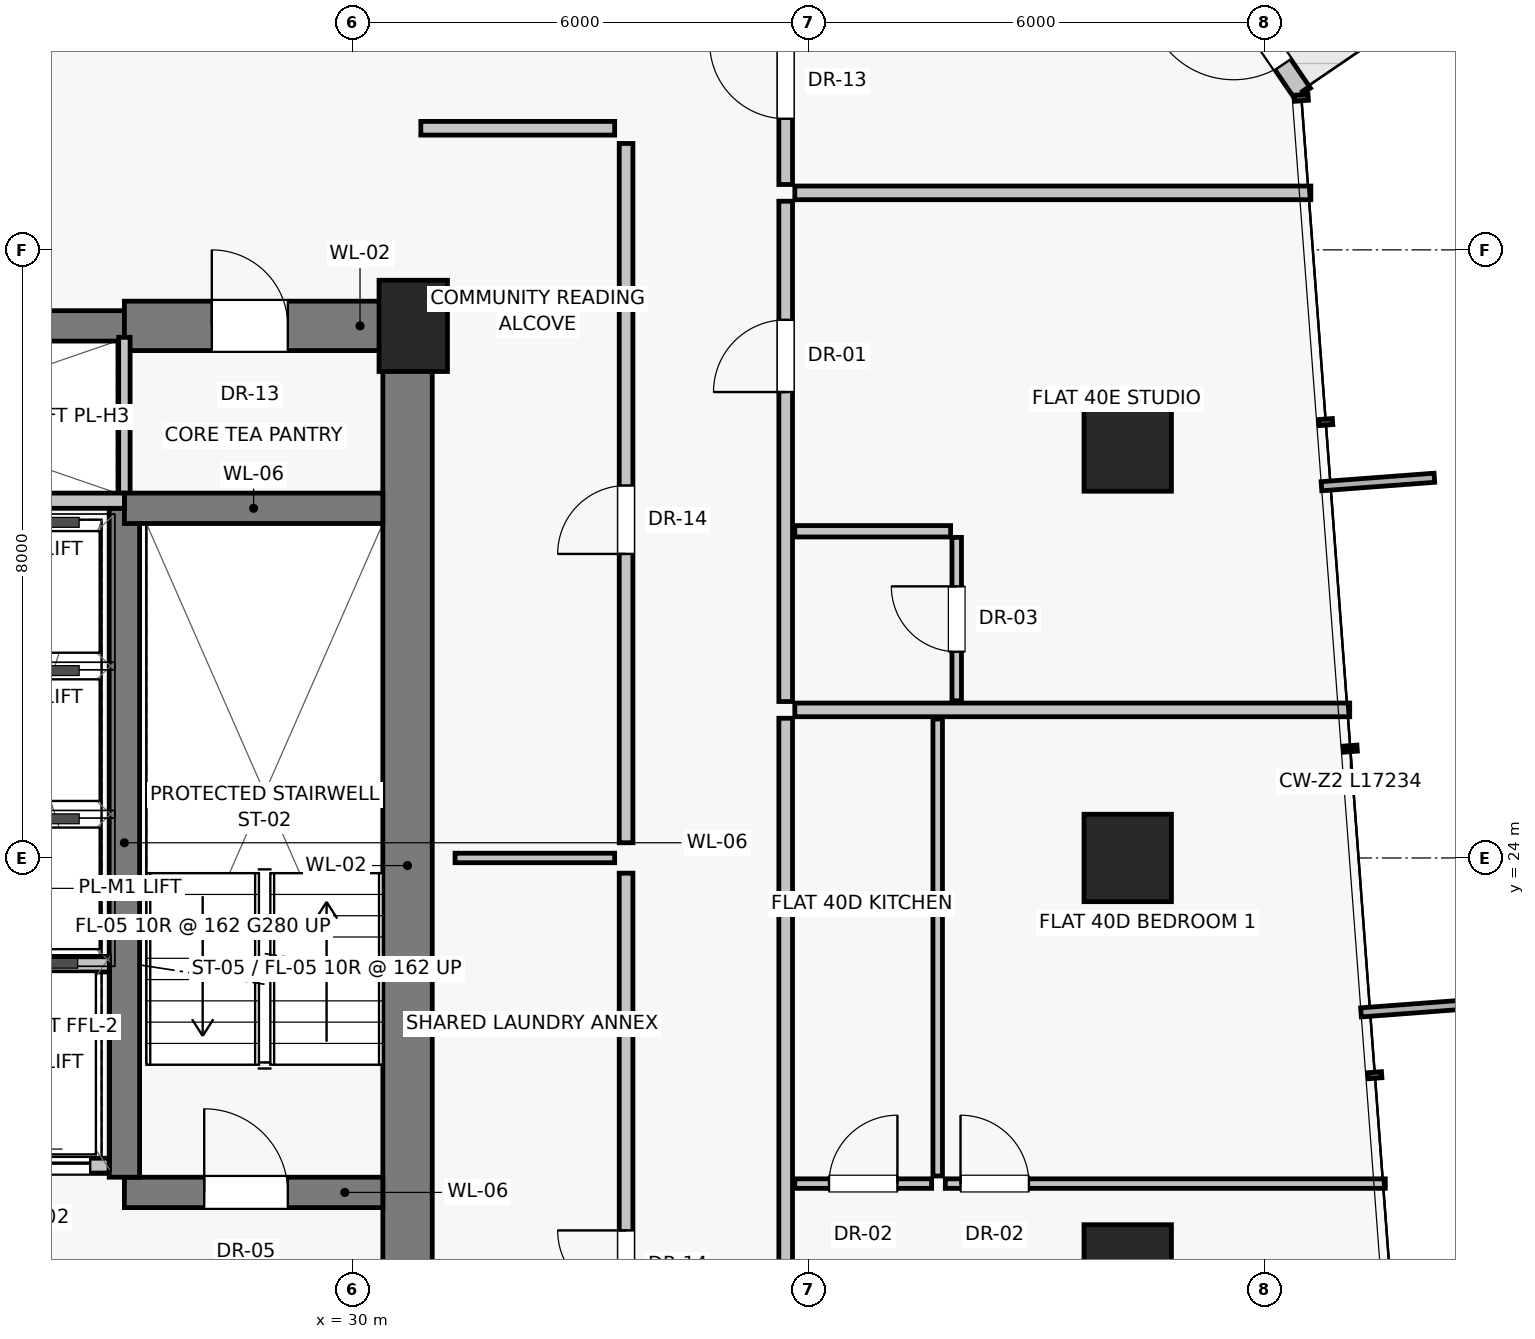
"""IFC4 building model, lengths in metres.
Left out: names, types, materials, properties, quantities, classifications, styles, units other than length and angle.
Written with IfcOpenShell. Run it as: python <this file> out.ifc"""

import sys

from ifc_helpers import new_model, si_unit, direction, frame, frame_2d, origin, origin_2d, place, context, subcontext, project, spatial, rectangle, extrude, source, transform, mapped, element, fill, save


model = new_model("IFC4")
c1 = context("Model", 3, precision=1e-05, world=origin(), true_north=direction((0.0, 1.0)))
c2 = subcontext(c1, "Body", "Model", "MODEL_VIEW")
j1 = project(units=[si_unit("LENGTHUNIT", "METRE"), si_unit("PLANEANGLEUNIT", "RADIAN")], contexts=[c1])
p1 = place(None, origin())
s1 = spatial("IfcSite", under=j1, at=p1, CompositionType="ELEMENT")
p2 = place(p1, origin())
s2 = spatial("IfcBuilding", under=s1, at=p2, CompositionType="ELEMENT")
p3 = place(p2, frame((0.0, 0.0, 142.5)))
s3 = spatial("IfcBuildingStorey", under=s2, at=p3, CompositionType="ELEMENT", Elevation=142.5)
p4 = place(p3, frame((30.8, 31.0, 0.0), z_axis=(0.0, 0.0, 1.0), x_axis=(1.0, 0.0, 0.0)))
e1 = element("IfcColumn", 1, at=p4, inside=s3, PredefinedType="PILASTER", context=c2, shape_type="SweptSolid", body=[
    extrude(rectangle(XDim=0.9, YDim=1.2, at=origin_2d()), origin(), (0.0, 0.0, 1.0), 3.25),
])
for number, where, z_axis, x_axis in (
    (2, (40.2, 18.6, 0.0), (0.0, 0.0, 1.0), (1.0, 0.0, 0.0)),
    (3, (40.2, 24.0, 0.0), (0.0, 0.0, 1.0), (1.0, 0.0, 0.0)),
    (4, (40.2, 29.4, 0.0), (0.0, 0.0, 1.0), (1.0, 0.0, 0.0)),
):
    element("IfcColumn", number, at=place(p3, frame(where, z_axis=z_axis, x_axis=x_axis)), inside=s3, PredefinedType="COLUMN", context=c2, shape_type="SweptSolid", body=[
        extrude(rectangle(XDim=1.15, YDim=1.15, at=origin_2d()), origin(), (0.0, 0.0, 1.0), 3.25),
    ])
p5 = place(p3, frame((42.5, 34.058, 0.0), z_axis=(0.0, 0.0, 1.0), x_axis=(-0.563546195047, 0.826084551392, 0.0)))
e5 = element("IfcWall", 5, at=p5, inside=s3, PredefinedType="SOLIDWALL", context=c2, shape_type="SweptSolid", body=[
    extrude(rectangle(XDim=4.233, YDim=0.25, at=frame_2d((2.116, 0.0))), origin(), (0.0, 0.0, 1.0), 3.0),
])
p6 = place(p5, frame((0.46, 0.0, 0.0)))
e6 = element("IfcOpeningElement", 6, at=p6, cuts=e5, PredefinedType="OPENING", context=c2, shape_type="SweptSolid", body=[
    extrude(rectangle(XDim=1.15, YDim=2.25, at=frame_2d((0.575, 1.125))), frame((0.0, 0.135, 0.0), z_axis=(0.0, -1.0, 0.0), x_axis=(1.0, 0.0, 0.0)), (0.0, 0.0, 1.0), 0.27),
])
p7 = place(p3, frame((30.725, 16.8, 0.0), z_axis=(0.0, 0.0, 1.0), x_axis=(0.0, 1.0, 0.0)))
e7 = element("IfcWall", 7, at=p7, inside=s3, PredefinedType="SHEAR", context=c2, shape_type="SweptSolid", body=[
    extrude(rectangle(XDim=14.2, YDim=0.65, at=frame_2d((7.1, 0.0))), origin(), (0.0, 0.0, 1.0), 3.0),
])
p8 = place(p3, frame((21.0, 31.0, 0.0), z_axis=(0.0, 0.0, 1.0), x_axis=(1.0, 0.0, 0.0)))
e8 = element("IfcWall", 8, at=p8, inside=s3, PredefinedType="SHEAR", context=c2, shape_type="SweptSolid", body=[
    extrude(rectangle(XDim=6.0, YDim=0.4, at=frame_2d((3.0, 0.0))), origin(), (0.0, 0.0, 1.0), 3.0),
])
p9 = place(p3, frame((27.0, 31.0, 0.0), z_axis=(0.0, 0.0, 1.0), x_axis=(1.0, 0.0, 0.0)))
e9 = element("IfcWall", 9, at=p9, inside=s3, PredefinedType="SHEAR", context=c2, shape_type="SweptSolid", body=[
    extrude(rectangle(XDim=3.8, YDim=0.65, at=frame_2d((1.9, 0.0))), origin(), (0.0, 0.0, 1.0), 3.0),
])
p10 = place(p9, frame((1.15, 0.0, 0.0)))
e10 = element("IfcOpeningElement", 10, at=p10, cuts=e9, PredefinedType="OPENING", context=c2, shape_type="SweptSolid", body=[
    extrude(rectangle(XDim=1.0, YDim=2.01, at=frame_2d((0.5, 1.005))), frame((0.0, 0.335, 0.0), z_axis=(0.0, -1.0, 0.0), x_axis=(1.0, 0.0, 0.0)), (0.0, 0.0, 1.0), 0.67),
])
p11 = place(p3, frame((27.0, 28.65, 0.0), z_axis=(0.0, 0.0, 1.0), x_axis=(0.0, 1.0, 0.0)))
e11 = element("IfcWall", 11, at=p11, inside=s3, PredefinedType="PARTITIONING", context=c2, shape_type="SweptSolid", body=[
    extrude(rectangle(XDim=2.2, YDim=0.15, at=frame_2d((1.1, 0.0))), origin(), (0.0, 0.0, 1.0), 3.0),
])
p12 = place(p3, frame((24.95, 19.95, 0.0), z_axis=(0.0, 0.0, 1.0), x_axis=(1.0, 0.0, 0.0)))
e12 = element("IfcWall", 12, at=p12, inside=s3, PredefinedType="SOLIDWALL", context=c2, shape_type="SweptSolid", body=[
    extrude(rectangle(XDim=1.85, YDim=0.2, at=frame_2d((0.925, 0.0))), origin(), (0.0, 0.0, 1.0), 3.0),
])
p13 = place(p12, frame((0.3, 0.0, 0.0)))
e13 = element("IfcOpeningElement", 13, at=p13, cuts=e12, PredefinedType="OPENING", context=c2, shape_type="SweptSolid", body=[
    extrude(rectangle(XDim=1.3, YDim=2.25, at=frame_2d((0.65, 1.125))), frame((0.0, 0.11, 0.0), z_axis=(0.0, -1.0, 0.0), x_axis=(1.0, 0.0, 0.0)), (0.0, 0.0, 1.0), 0.22),
])
p14 = place(p3, frame((27.0, 19.6, 0.0), z_axis=(0.0, 0.0, 1.0), x_axis=(1.0, 0.0, 0.0)))
e14 = element("IfcWall", 14, at=p14, inside=s3, PredefinedType="SHEAR", context=c2, shape_type="SweptSolid", body=[
    extrude(rectangle(XDim=3.4, YDim=0.4, at=frame_2d((1.7, 0.0))), origin(), (0.0, 0.0, 1.0), 3.0),
])
p15 = place(p14, frame((1.05, 0.0, 0.0)))
e15 = element("IfcOpeningElement", 15, at=p15, cuts=e14, PredefinedType="OPENING", context=c2, shape_type="SweptSolid", body=[
    extrude(rectangle(XDim=1.1, YDim=2.03, at=frame_2d((0.55, 1.015))), frame((0.0, 0.21, 0.0), z_axis=(0.0, -1.0, 0.0), x_axis=(1.0, 0.0, 0.0)), (0.0, 0.0, 1.0), 0.42),
])
p16 = place(p3, frame((27.0, 19.8, 0.0), z_axis=(0.0, 0.0, 1.0), x_axis=(0.0, 1.0, 0.0)))
e16 = element("IfcWall", 16, at=p16, inside=s3, PredefinedType="SHEAR", context=c2, shape_type="SweptSolid", body=[
    extrude(rectangle(XDim=8.8, YDim=0.4, at=frame_2d((4.4, 0.0))), origin(), (0.0, 0.0, 1.0), 3.0),
])
p17 = place(p3, frame((27.0, 28.6, 0.0), z_axis=(0.0, 0.0, 1.0), x_axis=(1.0, 0.0, 0.0)))
e17 = element("IfcWall", 17, at=p17, inside=s3, PredefinedType="SHEAR", context=c2, shape_type="SweptSolid", body=[
    extrude(rectangle(XDim=3.4, YDim=0.4, at=frame_2d((1.7, 0.0))), origin(), (0.0, 0.0, 1.0), 3.0),
])
p18 = place(p3, frame((24.85, 22.6, 0.0), z_axis=(0.0, 0.0, 1.0), x_axis=(1.0, 0.0, 0.0)))
e18 = element("IfcWall", 18, at=p18, inside=s3, PredefinedType="SOLIDWALL", context=c2, shape_type="SweptSolid", body=[
    extrude(rectangle(XDim=1.95, YDim=0.2, at=frame_2d((0.975, 0.0))), origin(), (0.0, 0.0, 1.0), 3.0),
])
p19 = place(p3, frame((21.0, 28.7, 0.0), z_axis=(0.0, 0.0, 1.0), x_axis=(1.0, 0.0, 0.0)))
e19 = element("IfcWall", 19, at=p19, inside=s3, PredefinedType="SOLIDWALL", context=c2, shape_type="SweptSolid", body=[
    extrude(rectangle(XDim=6.0, YDim=0.2, at=frame_2d((3.0, 0.0))), origin(), (0.0, 0.0, 1.0), 3.0),
])
p20 = place(p3, frame((33.6, 14.4, 0.0), z_axis=(0.0, 0.0, 1.0), x_axis=(0.0, 1.0, 0.0)))
e20 = element("IfcWall", 20, at=p20, inside=s3, PredefinedType="PARTITIONING", context=c2, shape_type="SweptSolid", body=[
    extrude(rectangle(XDim=9.4, YDim=0.18, at=frame_2d((4.7, 0.0))), origin(), (0.0, 0.0, 1.0), 3.0),
])
p21 = place(p20, frame((3.8, 0.0, 0.0)))
e21 = element("IfcOpeningElement", 21, at=p21, cuts=e20, PredefinedType="OPENING", context=c2, shape_type="SweptSolid", body=[
    extrude(rectangle(XDim=0.9, YDim=2.01, at=frame_2d((0.45, 1.005))), frame((0.0, 0.1, 0.0), z_axis=(0.0, -1.0, 0.0), x_axis=(1.0, 0.0, 0.0)), (0.0, 0.0, 1.0), 0.2),
])
p22 = place(p3, frame((33.6, 24.2, 0.0), z_axis=(0.0, 0.0, 1.0), x_axis=(0.0, 1.0, 0.0)))
e22 = element("IfcWall", 22, at=p22, inside=s3, PredefinedType="PARTITIONING", context=c2, shape_type="SweptSolid", body=[
    extrude(rectangle(XDim=9.2, YDim=0.18, at=frame_2d((4.6, 0.0))), origin(), (0.0, 0.0, 1.0), 3.0),
])
p23 = place(p22, frame((3.8, 0.0, 0.0)))
e23 = element("IfcOpeningElement", 23, at=p23, cuts=e22, PredefinedType="OPENING", context=c2, shape_type="SweptSolid", body=[
    extrude(rectangle(XDim=0.9, YDim=2.01, at=frame_2d((0.45, 1.005))), frame((0.0, 0.1, 0.0), z_axis=(0.0, -1.0, 0.0), x_axis=(1.0, 0.0, 0.0)), (0.0, 0.0, 1.0), 0.2),
])
p24 = place(p3, frame((31.35, 24.0, 0.0), z_axis=(0.0, 0.0, 1.0), x_axis=(1.0, 0.0, 0.0)))
e24 = element("IfcWall", 24, at=p24, inside=s3, PredefinedType="PARTITIONING", context=c2, shape_type="SweptSolid", body=[
    extrude(rectangle(XDim=2.1, YDim=0.125, at=frame_2d((1.05, 0.0))), origin(), (0.0, 0.0, 1.0), 3.0),
])
p25 = place(p3, frame((30.9, 33.6, 0.0), z_axis=(0.0, 0.0, 1.0), x_axis=(1.0, 0.0, 0.0)))
e25 = element("IfcWall", 25, at=p25, inside=s3, PredefinedType="PARTITIONING", context=c2, shape_type="SweptSolid", body=[
    extrude(rectangle(XDim=2.55, YDim=0.18, at=frame_2d((1.275, 0.0))), origin(), (0.0, 0.0, 1.0), 3.0),
])
p26 = place(p3, frame((35.7, 12.21, 0.0), z_axis=(0.0, 0.0, 1.0), x_axis=(0.0, 1.0, 0.0)))
e26 = element("IfcWall", 26, at=p26, inside=s3, PredefinedType="PARTITIONING", context=c2, shape_type="SweptSolid", body=[
    extrude(rectangle(XDim=13.628, YDim=0.18, at=frame_2d((6.814, 0.0))), origin(), (0.0, 0.0, 1.0), 2.58),
])
p27 = place(p26, frame((4.348, 0.0, 0.0)))
e27 = element("IfcOpeningElement", 27, at=p27, cuts=e26, PredefinedType="OPENING", context=c2, shape_type="SweptSolid", body=[
    extrude(rectangle(XDim=0.95, YDim=2.02, at=frame_2d((0.475, 1.01))), frame((0.0, 0.1, 0.0), z_axis=(0.0, -1.0, 0.0), x_axis=(1.0, 0.0, 0.0)), (0.0, 0.0, 1.0), 0.2),
])
p28 = place(p3, frame((35.82, 19.716, 0.0), z_axis=(0.0, 0.0, 1.0), x_axis=(1.0, 0.0, 0.0)))
e28 = element("IfcWall", 28, at=p28, inside=s3, PredefinedType="PARTITIONING", context=c2, shape_type="SweptSolid", body=[
    extrude(rectangle(XDim=1.8, YDim=0.125, at=frame_2d((0.9, 0.0))), origin(), (0.0, 0.0, 1.0), 3.0),
])
p29 = place(p28, frame((0.45, 0.0, 0.0)))
e29 = element("IfcOpeningElement", 29, at=p29, cuts=e28, PredefinedType="OPENING", context=c2, shape_type="SweptSolid", body=[
    extrude(rectangle(XDim=0.9, YDim=2.01, at=frame_2d((0.45, 1.005))), frame((0.0, 0.073, 0.0), z_axis=(0.0, -1.0, 0.0), x_axis=(1.0, 0.0, 0.0)), (0.0, 0.0, 1.0), 0.145),
])
p30 = place(p3, frame((37.7, 19.816, 0.0), z_axis=(0.0, 0.0, 1.0), x_axis=(0.0, 1.0, 0.0)))
e30 = element("IfcWall", 30, at=p30, inside=s3, PredefinedType="PARTITIONING", context=c2, shape_type="SweptSolid", body=[
    extrude(rectangle(XDim=6.012, YDim=0.125, at=frame_2d((3.006, 0.0))), origin(), (0.0, 0.0, 1.0), 3.0),
])
p31 = place(p3, frame((37.8, 19.716, 0.0), z_axis=(0.0, 0.0, 1.0), x_axis=(1.0, 0.0, 0.0)))
e31 = element("IfcWall", 31, at=p31, inside=s3, PredefinedType="PARTITIONING", context=c2, shape_type="SweptSolid", body=[
    extrude(rectangle(XDim=5.789, YDim=0.125, at=frame_2d((2.895, 0.0))), origin(), (0.0, 0.0, 1.0), 3.0),
])
p32 = place(p31, frame((0.2, 0.0, 0.0)))
e32 = element("IfcOpeningElement", 32, at=p32, cuts=e31, PredefinedType="OPENING", context=c2, shape_type="SweptSolid", body=[
    extrude(rectangle(XDim=0.9, YDim=2.01, at=frame_2d((0.45, 1.005))), frame((0.0, 0.073, 0.0), z_axis=(0.0, -1.0, 0.0), x_axis=(1.0, 0.0, 0.0)), (0.0, 0.0, 1.0), 0.145),
])
p33 = place(p3, frame((35.82, 25.948, 0.0), z_axis=(0.0, 0.0, 1.0), x_axis=(1.0, 0.0, 0.0)))
e33 = element("IfcWall", 33, at=p33, inside=s3, PredefinedType="PARTITIONING", context=c2, shape_type="SweptSolid", body=[
    extrude(rectangle(XDim=7.3, YDim=0.18, at=frame_2d((3.65, 0.0))), origin(), (0.0, 0.0, 1.0), 3.0),
])
p34 = place(p3, frame((35.7, 32.86, 0.0), z_axis=(0.0, 0.0, 1.0), x_axis=(0.0, 1.0, 0.0)))
e34 = element("IfcWall", 34, at=p34, inside=s3, PredefinedType="PARTITIONING", context=c2, shape_type="SweptSolid", body=[
    extrude(rectangle(XDim=2.73, YDim=0.18, at=frame_2d((1.365, 0.0))), origin(), (0.0, 0.0, 1.0), 3.0),
])
p35 = place(p34, frame((0.865, 0.0, 0.0)))
e35 = element("IfcOpeningElement", 35, at=p35, cuts=e34, PredefinedType="OPENING", context=c2, shape_type="SweptSolid", body=[
    extrude(rectangle(XDim=1.0, YDim=2.01, at=frame_2d((0.5, 1.005))), frame((0.0, 0.1, 0.0), z_axis=(0.0, -1.0, 0.0), x_axis=(1.0, 0.0, 0.0)), (0.0, 0.0, 1.0), 0.2),
])
p36 = place(p3, frame((35.82, 32.75, 0.0), z_axis=(0.0, 0.0, 1.0), x_axis=(1.0, 0.0, 0.0)))
e36 = element("IfcWall", 36, at=p36, inside=s3, PredefinedType="PARTITIONING", context=c2, shape_type="SweptSolid", body=[
    extrude(rectangle(XDim=6.789, YDim=0.18, at=frame_2d((3.395, 0.0))), origin(), (0.0, 0.0, 1.0), 3.0),
])
p37 = place(p3, frame((35.7, 26.058, 0.0), z_axis=(0.0, 0.0, 1.0), x_axis=(0.0, 1.0, 0.0)))
e37 = element("IfcWall", 37, at=p37, inside=s3, PredefinedType="PARTITIONING", context=c2, shape_type="SweptSolid", body=[
    extrude(rectangle(XDim=6.582, YDim=0.18, at=frame_2d((3.291, 0.0))), origin(), (0.0, 0.0, 1.0), 2.58),
])
p38 = place(p37, frame((4.072, 0.0, 0.0)))
e38 = element("IfcOpeningElement", 38, at=p38, cuts=e37, PredefinedType="OPENING", context=c2, shape_type="SweptSolid", body=[
    extrude(rectangle(XDim=0.95, YDim=2.02, at=frame_2d((0.475, 1.01))), frame((0.0, 0.1, 0.0), z_axis=(0.0, -1.0, 0.0), x_axis=(1.0, 0.0, 0.0)), (0.0, 0.0, 1.0), 0.2),
])
p39 = place(p3, frame((35.82, 28.298, 0.0), z_axis=(0.0, 0.0, 1.0), x_axis=(1.0, 0.0, 0.0)))
e39 = element("IfcWall", 39, at=p39, inside=s3, PredefinedType="PARTITIONING", context=c2, shape_type="SweptSolid", body=[
    extrude(rectangle(XDim=2.05, YDim=0.15, at=frame_2d((1.025, 0.0))), origin(), (0.0, 0.0, 1.0), 3.0),
])
p40 = place(p3, frame((37.95, 26.068, 0.0), z_axis=(0.0, 0.0, 1.0), x_axis=(0.0, 1.0, 0.0)))
e40 = element("IfcWall", 40, at=p40, inside=s3, PredefinedType="PARTITIONING", context=c2, shape_type="SweptSolid", body=[
    extrude(rectangle(XDim=2.15, YDim=0.125, at=frame_2d((1.075, 0.0))), origin(), (0.0, 0.0, 1.0), 3.0),
])
p41 = place(p40, frame((0.645, 0.0, 0.0)))
e41 = element("IfcOpeningElement", 41, at=p41, cuts=e40, PredefinedType="OPENING", context=c2, shape_type="SweptSolid", body=[
    extrude(rectangle(XDim=0.86, YDim=2.01, at=frame_2d((0.43, 1.005))), frame((0.0, 0.073, 0.0), z_axis=(0.0, -1.0, 0.0), x_axis=(1.0, 0.0, 0.0)), (0.0, 0.0, 1.0), 0.145),
])
m1 = source(origin(), c2, "Body", "SweptSolid", [
    extrude(rectangle(XDim=1.15, YDim=2.25, at=frame_2d((0.575, 1.125))), frame((0.0, 0.025, 0.0), z_axis=(0.0, -1.0, 0.0), x_axis=(1.0, 0.0, 0.0)), (0.0, 0.0, 1.0), 0.05),
])
p42 = place(p6, frame((1.15, 0.0, 0.0), z_axis=(0.0, 0.0, 1.0), x_axis=(-1.0, 0.0, 0.0)))
e42 = element("IfcDoor", 42, at=p42, inside=s3, OperationType="SINGLE_SWING_RIGHT", PredefinedType="DOOR", context=c2, shape_type="MappedRepresentation", body=[
    mapped(m1, transform((0.0, 0.0, 0.0), scale=1.0)),
])
fill(e6, e42)
m2 = source(origin(), c2, "Body", "SweptSolid", [
    extrude(rectangle(XDim=1.0, YDim=2.01, at=frame_2d((0.5, 1.005))), frame((0.0, 0.025, 0.0), z_axis=(0.0, -1.0, 0.0), x_axis=(1.0, 0.0, 0.0)), (0.0, 0.0, 1.0), 0.05),
])
p43 = place(p10, origin())
e43 = element("IfcDoor", 43, at=p43, inside=s3, OperationType="SINGLE_SWING_LEFT", PredefinedType="DOOR", context=c2, shape_type="MappedRepresentation", body=[
    mapped(m2, transform((0.0, 0.0, 0.0), scale=1.0)),
])
fill(e10, e43)
m3 = source(origin(), c2, "Body", "SweptSolid", [
    extrude(rectangle(XDim=1.3, YDim=2.25, at=frame_2d((0.65, 1.125))), frame((0.0, 0.025, 0.0), z_axis=(0.0, -1.0, 0.0), x_axis=(1.0, 0.0, 0.0)), (0.0, 0.0, 1.0), 0.05),
])
p44 = place(p13, origin())
e44 = element("IfcDoor", 44, at=p44, inside=s3, OperationType="SLIDING_TO_LEFT", PredefinedType="DOOR", context=c2, shape_type="MappedRepresentation", body=[
    mapped(m3, transform((0.0, 0.0, 0.0), scale=1.0)),
])
fill(e13, e44)
m4 = source(origin(), c2, "Body", "SweptSolid", [
    extrude(rectangle(XDim=1.1, YDim=2.03, at=frame_2d((0.55, 1.015))), frame((0.0, 0.025, 0.0), z_axis=(0.0, -1.0, 0.0), x_axis=(1.0, 0.0, 0.0)), (0.0, 0.0, 1.0), 0.05),
])
p45 = place(p15, origin())
e45 = element("IfcDoor", 45, at=p45, inside=s3, OperationType="SINGLE_SWING_LEFT", PredefinedType="DOOR", context=c2, shape_type="MappedRepresentation", body=[
    mapped(m4, transform((0.0, 0.0, 0.0), scale=1.0)),
])
fill(e15, e45)
m5 = source(origin(), c2, "Body", "SweptSolid", [
    extrude(rectangle(XDim=0.9, YDim=2.01, at=frame_2d((0.45, 1.005))), frame((0.0, 0.025, 0.0), z_axis=(0.0, -1.0, 0.0), x_axis=(1.0, 0.0, 0.0)), (0.0, 0.0, 1.0), 0.05),
])
p46 = place(p21, origin())
e46 = element("IfcDoor", 46, at=p46, inside=s3, OperationType="SINGLE_SWING_RIGHT", PredefinedType="DOOR", context=c2, shape_type="MappedRepresentation", body=[
    mapped(m5, transform((0.0, 0.0, 0.0), scale=1.0)),
])
fill(e21, e46)
p47 = place(p23, origin())
e47 = element("IfcDoor", 47, at=p47, inside=s3, OperationType="SINGLE_SWING_LEFT", PredefinedType="DOOR", context=c2, shape_type="MappedRepresentation", body=[
    mapped(m5, transform((0.0, 0.0, 0.0), scale=1.0)),
])
fill(e23, e47)
p48 = place(p29, origin())
e48 = element("IfcDoor", 48, at=p48, inside=s3, OperationType="SINGLE_SWING_RIGHT", PredefinedType="DOOR", context=c2, shape_type="MappedRepresentation", body=[
    mapped(m5, transform((0.0, 0.0, 0.0), scale=1.0)),
])
fill(e29, e48)
p49 = place(p32, origin())
e49 = element("IfcDoor", 49, at=p49, inside=s3, OperationType="SINGLE_SWING_LEFT", PredefinedType="DOOR", context=c2, shape_type="MappedRepresentation", body=[
    mapped(m5, transform((0.0, 0.0, 0.0), scale=1.0)),
])
fill(e32, e49)
p50 = place(p35, origin())
e50 = element("IfcDoor", 50, at=p50, inside=s3, OperationType="SINGLE_SWING_RIGHT", PredefinedType="DOOR", context=c2, shape_type="MappedRepresentation", body=[
    mapped(m2, transform((0.0, 0.0, 0.0), scale=1.0)),
])
fill(e35, e50)
m6 = source(origin(), c2, "Body", "SweptSolid", [
    extrude(rectangle(XDim=0.95, YDim=2.02, at=frame_2d((0.475, 1.01))), frame((0.0, 0.025, 0.0), z_axis=(0.0, -1.0, 0.0), x_axis=(1.0, 0.0, 0.0)), (0.0, 0.0, 1.0), 0.05),
])
p51 = place(p38, origin())
e51 = element("IfcDoor", 51, at=p51, inside=s3, OperationType="SINGLE_SWING_LEFT", PredefinedType="DOOR", context=c2, shape_type="MappedRepresentation", body=[
    mapped(m6, transform((0.0, 0.0, 0.0), scale=1.0)),
])
fill(e38, e51)
m7 = source(origin(), c2, "Body", "SweptSolid", [
    extrude(rectangle(XDim=0.86, YDim=2.01, at=frame_2d((0.43, 1.005))), frame((0.0, 0.025, 0.0), z_axis=(0.0, -1.0, 0.0), x_axis=(1.0, 0.0, 0.0)), (0.0, 0.0, 1.0), 0.05),
])
p52 = place(p41, origin())
e52 = element("IfcDoor", 52, at=p52, inside=s3, OperationType="SINGLE_SWING_RIGHT", PredefinedType="DOOR", context=c2, shape_type="MappedRepresentation", body=[
    mapped(m7, transform((0.0, 0.0, 0.0), scale=1.0)),
])
fill(e41, e52)
save(model, sys.argv[1])
